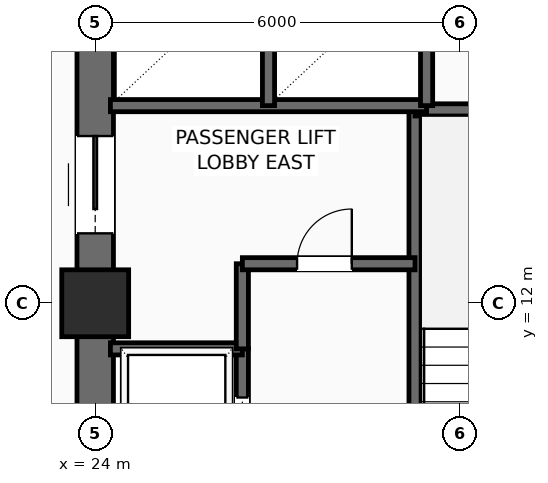
"""IFC4 building model, lengths in metres.
Left out: names, types, materials, properties, quantities, classifications, styles, units other than length and angle.
Written with IfcOpenShell. Run it as: python <this file> out.ifc"""

import sys

from ifc_helpers import new_model, si_unit, direction, frame, frame_2d, origin, origin_2d, place, context, subcontext, project, spatial, rectangle, extrude, element, fill, save


model = new_model("IFC4")
c1 = context("Model", 3, precision=1e-05, world=origin(), true_north=direction((0.0, 1.0)))
c2 = subcontext(c1, "Body", "Model", "MODEL_VIEW")
j1 = project(units=[si_unit("LENGTHUNIT", "METRE"), si_unit("PLANEANGLEUNIT", "RADIAN")], contexts=[c1])
p1 = place(None, origin())
s1 = spatial("IfcSite", under=j1, at=p1, CompositionType="ELEMENT")
p2 = place(p1, origin())
s2 = spatial("IfcBuilding", under=s1, at=p2, CompositionType="ELEMENT")
p3 = place(p2, frame((0.0, 0.0, 145.65)))
s3 = spatial("IfcBuildingStorey", under=s2, at=p3, CompositionType="ELEMENT", Elevation=145.65)
p4 = place(p3, frame((24.0, 12.0, 0.0), z_axis=(0.0, 0.0, 1.0), x_axis=(1.0, 0.0, 0.0)))
e1 = element("IfcColumn", 1, at=p4, inside=s3, PredefinedType="COLUMN", context=c2, shape_type="SweptSolid", body=[
    extrude(rectangle(XDim=1.1, YDim=1.1, at=origin_2d()), origin(), (0.0, 0.0, 1.0), 3.75),
])
p5 = place(p3, frame((24.0, 6.0, 0.0), z_axis=(0.0, 0.0, 1.0), x_axis=(0.0, 1.0, 0.0)))
e2 = element("IfcWall", 2, at=p5, inside=s3, PredefinedType="SHEAR", context=c2, shape_type="SweptSolid", body=[
    extrude(rectangle(XDim=12.0, YDim=0.6, at=frame_2d((6.0, 0.0))), origin(), (0.0, 0.0, 1.0), 3.525),
])
p6 = place(p5, frame((7.15, 0.0, 0.0)))
e3 = element("IfcOpeningElement", 3, at=p6, cuts=e2, PredefinedType="OPENING", context=c2, shape_type="SweptSolid", body=[
    extrude(rectangle(XDim=1.6, YDim=2.3, at=frame_2d((0.8, 1.15))), frame((0.0, 0.31, 0.0), z_axis=(0.0, -1.0, 0.0), x_axis=(1.0, 0.0, 0.0)), (0.0, 0.0, 1.0), 0.62),
])
p7 = place(p3, frame((29.26, 6.3, 0.0), z_axis=(0.0, 0.0, 1.0), x_axis=(0.0, 1.0, 0.0)))
e4 = element("IfcWall", 4, at=p7, inside=s3, PredefinedType="SHEAR", context=c2, shape_type="SweptSolid", body=[
    extrude(rectangle(XDim=8.88, YDim=0.2, at=frame_2d((4.44, 0.0))), origin(), (0.0, 0.0, 1.0), 3.525),
])
p8 = place(p7, frame((0.35, 0.0, 0.0)))
e5 = element("IfcOpeningElement", 5, at=p8, cuts=e4, PredefinedType="OPENING", context=c2, shape_type="SweptSolid", body=[
    extrude(rectangle(XDim=1.1, YDim=2.2, at=frame_2d((0.55, 1.1))), frame((0.0, 0.11, 0.0), z_axis=(0.0, -1.0, 0.0), x_axis=(1.0, 0.0, 0.0)), (0.0, 0.0, 1.0), 0.22),
])
p9 = place(p3, frame((29.26, 15.18, 0.0), z_axis=(0.0, 0.0, 1.0), x_axis=(1.0, 0.0, 0.0)))
e6 = element("IfcWall", 6, at=p9, inside=s3, PredefinedType="SHEAR", context=c2, shape_type="SweptSolid", body=[
    extrude(rectangle(XDim=4.04, YDim=0.2, at=frame_2d((2.02, 0.0))), origin(), (0.0, 0.0, 1.0), 3.525),
])
p10 = place(p3, frame((26.42, 6.3, 0.0), z_axis=(0.0, 0.0, 1.0), x_axis=(0.0, 1.0, 0.0)))
e7 = element("IfcWall", 7, at=p10, inside=s3, PredefinedType="SHEAR", context=c2, shape_type="SweptSolid", body=[
    extrude(rectangle(XDim=4.95, YDim=0.2, at=frame_2d((2.475, 0.0))), origin(), (0.0, 0.0, 1.0), 3.525),
])
p11 = place(p10, frame((0.65, 0.0, 0.0)))
e8 = element("IfcOpeningElement", 8, at=p11, cuts=e7, PredefinedType="OPENING", context=c2, shape_type="SweptSolid", body=[
    extrude(rectangle(XDim=1.1, YDim=2.2, at=frame_2d((0.55, 1.1))), frame((0.0, 0.11, 0.0), z_axis=(0.0, -1.0, 0.0), x_axis=(1.0, 0.0, 0.0)), (0.0, 0.0, 1.0), 0.22),
])
p12 = place(p10, frame((3.05, 0.0, 0.0)))
e9 = element("IfcOpeningElement", 9, at=p12, cuts=e7, PredefinedType="OPENING", context=c2, shape_type="SweptSolid", body=[
    extrude(rectangle(XDim=1.1, YDim=2.2, at=frame_2d((0.55, 1.1))), frame((0.0, 0.11, 0.0), z_axis=(0.0, -1.0, 0.0), x_axis=(1.0, 0.0, 0.0)), (0.0, 0.0, 1.0), 0.22),
])
p13 = place(p3, frame((24.25, 11.25, 0.0), z_axis=(0.0, 0.0, 1.0), x_axis=(1.0, 0.0, 0.0)))
e10 = element("IfcWall", 10, at=p13, inside=s3, PredefinedType="SHEAR", context=c2, shape_type="SweptSolid", body=[
    extrude(rectangle(XDim=2.17, YDim=0.2, at=frame_2d((1.085, 0.0))), origin(), (0.0, 0.0, 1.0), 3.525),
])
p14 = place(p3, frame((26.42, 11.25, 0.0), z_axis=(0.0, 0.0, 1.0), x_axis=(0.0, 1.0, 0.0)))
e11 = element("IfcWall", 11, at=p14, inside=s3, PredefinedType="SHEAR", context=c2, shape_type="SweptSolid", body=[
    extrude(rectangle(XDim=1.4, YDim=0.2, at=frame_2d((0.7, 0.0))), origin(), (0.0, 0.0, 1.0), 3.525),
])
p15 = place(p3, frame((26.42, 12.65, 0.0), z_axis=(0.0, 0.0, 1.0), x_axis=(1.0, 0.0, 0.0)))
e12 = element("IfcWall", 12, at=p15, inside=s3, PredefinedType="SHEAR", context=c2, shape_type="SweptSolid", body=[
    extrude(rectangle(XDim=2.84, YDim=0.2, at=frame_2d((1.42, 0.0))), origin(), (0.0, 0.0, 1.0), 3.525),
])
p16 = place(p15, frame((0.9, 0.0, 0.0)))
e13 = element("IfcOpeningElement", 13, at=p16, cuts=e12, PredefinedType="OPENING", context=c2, shape_type="SweptSolid", body=[
    extrude(rectangle(XDim=0.9, YDim=2.15, at=frame_2d((0.45, 1.075))), frame((0.0, 0.11, 0.0), z_axis=(0.0, -1.0, 0.0), x_axis=(1.0, 0.0, 0.0)), (0.0, 0.0, 1.0), 0.22),
])
p17 = place(p3, frame((24.25, 15.25, 0.0), z_axis=(0.0, 0.0, 1.0), x_axis=(1.0, 0.0, 0.0)))
e14 = element("IfcWall", 14, at=p17, inside=s3, PredefinedType="SHEAR", context=c2, shape_type="SweptSolid", body=[
    extrude(rectangle(XDim=5.2, YDim=0.2, at=frame_2d((2.6, 0.0))), origin(), (0.0, 0.0, 1.0), 3.525),
])
p18 = place(p3, frame((26.85, 15.25, 0.0), z_axis=(0.0, 0.0, 1.0), x_axis=(0.0, 1.0, 0.0)))
e15 = element("IfcWall", 15, at=p18, inside=s3, PredefinedType="SHEAR", context=c2, shape_type="SweptSolid", body=[
    extrude(rectangle(XDim=2.4, YDim=0.2, at=frame_2d((1.2, 0.0))), origin(), (0.0, 0.0, 1.0), 3.525),
])
p19 = place(p3, frame((29.45, 15.25, 0.0), z_axis=(0.0, 0.0, 1.0), x_axis=(0.0, 1.0, 0.0)))
e16 = element("IfcWall", 16, at=p19, inside=s3, PredefinedType="SHEAR", context=c2, shape_type="SweptSolid", body=[
    extrude(rectangle(XDim=2.45, YDim=0.2, at=frame_2d((1.225, 0.0))), origin(), (0.0, 0.0, 1.0), 3.525),
])
p20 = place(p6, origin())
e17 = element("IfcDoor", 17, at=p20, inside=s3, OperationType="DOUBLE_DOOR_SLIDING", PredefinedType="DOOR", context=c2, shape_type="SweptSolid", body=[
    extrude(rectangle(XDim=1.6, YDim=2.3, at=frame_2d((0.8, 1.15))), frame((0.0, 0.025, 0.0), z_axis=(0.0, -1.0, 0.0), x_axis=(1.0, 0.0, 0.0)), (0.0, 0.0, 1.0), 0.05),
])
fill(e3, e17)
p21 = place(p12, origin())
e18 = element("IfcDoor", 18, at=p21, inside=s3, OperationType="SLIDING_TO_LEFT", PredefinedType="DOOR", context=c2, shape_type="SweptSolid", body=[
    extrude(rectangle(XDim=1.1, YDim=2.2, at=frame_2d((0.55, 1.1))), frame((0.0, 0.025, 0.0), z_axis=(0.0, -1.0, 0.0), x_axis=(1.0, 0.0, 0.0)), (0.0, 0.0, 1.0), 0.05),
])
fill(e9, e18)
p22 = place(p16, origin())
e19 = element("IfcDoor", 19, at=p22, inside=s3, OperationType="SINGLE_SWING_RIGHT", PredefinedType="DOOR", context=c2, shape_type="SweptSolid", body=[
    extrude(rectangle(XDim=0.9, YDim=2.15, at=frame_2d((0.45, 1.075))), frame((0.0, 0.025, 0.0), z_axis=(0.0, -1.0, 0.0), x_axis=(1.0, 0.0, 0.0)), (0.0, 0.0, 1.0), 0.05),
])
fill(e13, e19)
save(model, sys.argv[1])
